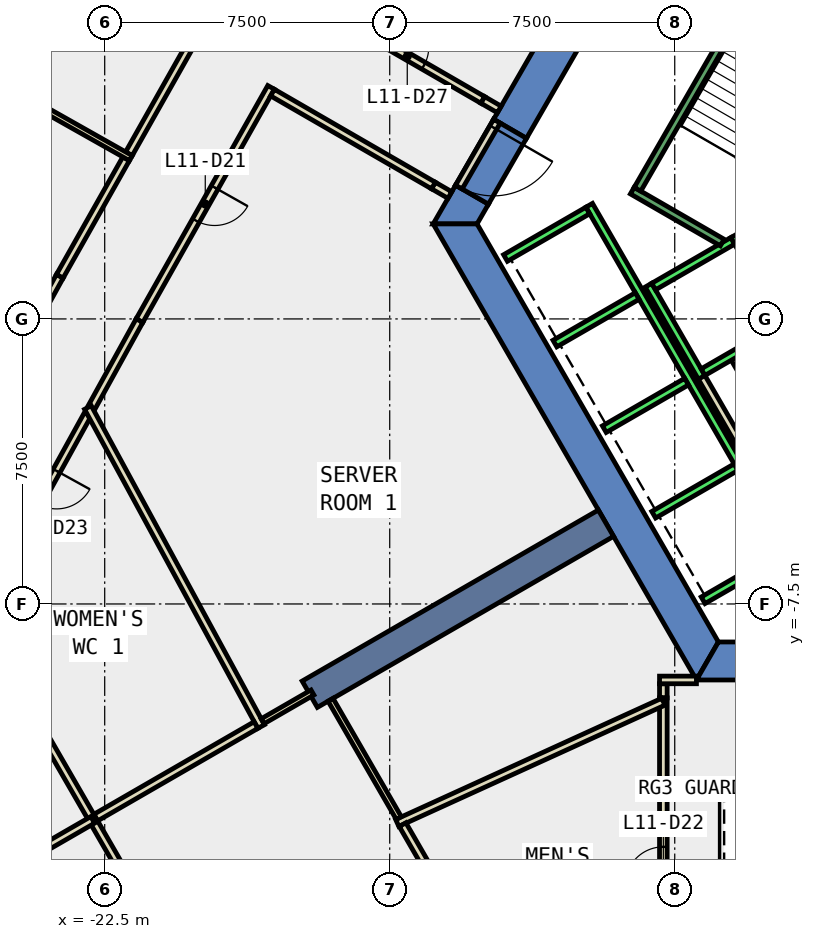
"""IFC4 building model, lengths in metres.
Left out: names, types, materials, properties, quantities, classifications, styles, units other than length and angle.
Written with IfcOpenShell. Run it as: python <this file> out.ifc"""

import sys

from ifc_helpers import new_model, si_unit, direction, frame, frame_2d, origin, place, context, subcontext, project, spatial, polyline, rectangle, outline, extrude, element, fill, save


model = new_model("IFC4")
c1 = context("Model", 3, precision=1e-05, world=origin(), true_north=direction((0.0, 1.0)))
c2 = subcontext(c1, "Body", "Model", "MODEL_VIEW")
j1 = project(units=[si_unit("LENGTHUNIT", "METRE"), si_unit("PLANEANGLEUNIT", "RADIAN")], contexts=[c1])
p1 = place(None, origin())
s1 = spatial("IfcSite", under=j1, at=p1, CompositionType="ELEMENT")
p2 = place(p1, origin())
s2 = spatial("IfcBuilding", under=s1, at=p2, CompositionType="ELEMENT")
p3 = place(p2, frame((0.0, 0.0, 56.0)))
s3 = spatial("IfcBuildingStorey", under=s2, at=p3, CompositionType="ELEMENT", Elevation=56.0)
p4 = place(p3, frame((0.0, 0.0, -0.4)))
e1 = element("IfcWall", 1, at=p4, inside=s3, PredefinedType="SHEAR", context=c2, shape_type="SweptSolid", body=[
    extrude(outline(polyline([(-12.267, 5.252), (-11.402, 4.752), (-6.351, 13.5), (-6.928, 14.5), (-12.267, 5.252)])), origin(), (0.0, 0.0, 1.0), 4.2),
])
p5 = place(p3, frame((0.0, 0.0, -0.4)))
e2 = element("IfcWall", 2, at=p5, inside=s3, PredefinedType="SHEAR", context=c2, shape_type="SweptSolid", body=[
    extrude(outline(polyline([(-12.402, 3.02), (-13.267, 3.52), (-13.856, 2.5), (-12.702, 2.5), (-12.402, 3.02)])), origin(), (0.0, 0.0, 1.0), 4.2),
])
p6 = place(p3, frame((0.0, 0.0, 3.6)))
e3 = element("IfcWall", 3, at=p6, inside=s3, PredefinedType="SHEAR", context=c2, shape_type="SweptSolid", body=[
    extrude(outline(polyline([(-13.267, 3.52), (-12.402, 3.02), (-11.402, 4.752), (-12.267, 5.252), (-13.267, 3.52)])), origin(), (0.0, 0.0, 1.0), 0.2),
])
p7 = place(p3, frame((0.0, 0.0, -0.4)))
e4 = element("IfcWall", 4, at=p7, inside=s3, PredefinedType="SHEAR", context=c2, shape_type="SweptSolid", body=[
    extrude(outline(polyline([(-13.856, 2.5), (-6.928, -9.5), (-6.351, -8.5), (-12.702, 2.5), (-13.856, 2.5)])), origin(), (0.0, 0.0, 1.0), 4.2),
])
p8 = place(p3, frame((0.0, 0.0, -0.4)))
e5 = element("IfcWall", 5, at=p8, inside=s3, PredefinedType="SHEAR", context=c2, shape_type="SweptSolid", body=[
    extrude(outline(polyline([(3.75, -9.5), (3.75, -8.5), (-6.351, -8.5), (-6.928, -9.5), (3.75, -9.5)])), origin(), (0.0, 0.0, 1.0), 4.2),
])
p9 = place(p3, frame((-9.31, -5.375, -0.4), z_axis=(0.0, 0.0, 1.0), x_axis=(-0.866017533419, -0.500013631625, 0.0)))
e6 = element("IfcWall", 6, at=p9, inside=s3, PredefinedType="SHEAR", context=c2, shape_type="SweptSolid", body=[
    extrude(rectangle(XDim=9.0, YDim=0.8, at=frame_2d((4.5, 0.0))), origin(), (0.0, 0.0, 1.0), 4.2),
])
p10 = place(p3, frame((-16.96, 8.308, 0.0), z_axis=(0.0, 0.0, 1.0), x_axis=(0.866018717003, -0.500011581666, 0.0)))
e7 = element("IfcWall", 7, at=p10, inside=s3, PredefinedType="PARTITIONING", context=c2, shape_type="SweptSolid", body=[
    extrude(rectangle(XDim=5.092, YDim=0.2, at=frame_2d((2.546, 0.0))), origin(), (0.0, 0.0, 1.0), 3.8),
])
p11 = place(p10, frame((2.296, 0.0, 0.0)))
e8 = element("IfcOpeningElement", 8, at=p11, cuts=e7, PredefinedType="OPENING", context=c2, shape_type="SweptSolid", body=[
    extrude(rectangle(XDim=1.0, YDim=2.1, at=frame_2d((0.5, 1.05))), frame((0.0, 0.11, 0.0), z_axis=(0.0, -1.0, 0.0), x_axis=(1.0, 0.0, 0.0)), (0.0, 0.0, 1.0), 0.22),
])
p12 = place(p3, frame((-13.417, 3.26, 0.0), z_axis=(0.0, 0.0, 1.0), x_axis=(-0.866071776036, 0.499919672301, 0.0)))
e9 = element("IfcWall", 9, at=p12, inside=s3, PredefinedType="PARTITIONING", context=c2, shape_type="SweptSolid", body=[
    extrude(rectangle(XDim=0.5, YDim=0.2, at=frame_2d((0.25, 0.0))), origin(), (0.0, 0.0, 1.0), 2.4),
])
p13 = place(p3, frame((-18.122, 6.092, 0.0), z_axis=(0.0, 0.0, 1.0), x_axis=(-0.491430359405, -0.870916874251, 0.0)))
e10 = element("IfcWall", 10, at=p13, inside=s3, PredefinedType="PARTITIONING", context=c2, shape_type="SweptSolid", body=[
    extrude(rectangle(XDim=7.047, YDim=0.2, at=frame_2d((3.523, 0.0))), origin(), (0.0, 0.0, 1.0), 3.8),
])
p14 = place(p13, frame((3.024, 0.0, 0.0)))
e11 = element("IfcOpeningElement", 11, at=p14, cuts=e10, PredefinedType="OPENING", context=c2, shape_type="SweptSolid", body=[
    extrude(rectangle(XDim=1.0, YDim=2.1, at=frame_2d((0.5, 1.05))), frame((0.0, 0.11, 0.0), z_axis=(0.0, -1.0, 0.0), x_axis=(1.0, 0.0, 0.0)), (0.0, 0.0, 1.0), 0.22),
])
p15 = place(p3, frame((-21.585, -0.045, 0.0), z_axis=(0.0, 0.0, 1.0), x_axis=(-0.483139162319, -0.875543573921, 0.0)))
e12 = element("IfcWall", 12, at=p15, inside=s3, PredefinedType="PARTITIONING", context=c2, shape_type="SweptSolid", body=[
    extrude(rectangle(XDim=2.61, YDim=0.2, at=frame_2d((1.305, 0.0))), origin(), (0.0, 0.0, 1.0), 3.8),
])
p16 = place(p3, frame((-22.942, -2.505, 0.0), z_axis=(0.0, 0.0, 1.0), x_axis=(-0.48320751977, -0.875505849688, 0.0)))
e13 = element("IfcWall", 13, at=p16, inside=s3, PredefinedType="PARTITIONING", context=c2, shape_type="SweptSolid", body=[
    extrude(rectangle(XDim=4.412, YDim=0.2, at=frame_2d((2.206, 0.0))), origin(), (0.0, 0.0, 1.0), 3.8),
])
p17 = place(p16, frame((1.706, 0.0, 0.0)))
e14 = element("IfcOpeningElement", 14, at=p17, cuts=e13, PredefinedType="OPENING", context=c2, shape_type="SweptSolid", body=[
    extrude(rectangle(XDim=1.0, YDim=2.1, at=frame_2d((0.5, 1.05))), frame((0.0, 0.11, 0.0), z_axis=(0.0, -1.0, 0.0), x_axis=(1.0, 0.0, 0.0)), (0.0, 0.0, 1.0), 0.22),
])
p18 = place(p3, frame((-21.863, 4.345, 0.0), z_axis=(0.0, 0.0, 1.0), x_axis=(0.491394823876, 0.87093692485, 0.0)))
e15 = element("IfcWall", 15, at=p18, inside=s3, PredefinedType="PARTITIONING", context=c2, shape_type="SweptSolid", body=[
    extrude(rectangle(XDim=3.547, YDim=0.2, at=frame_2d((1.773, 0.0))), origin(), (0.0, 0.0, 1.0), 3.8),
])
p19 = place(p3, frame((-27.217, -5.284, 0.0), z_axis=(0.0, 0.0, 1.0), x_axis=(0.483151415114, 0.875536812517, 0.0)))
e16 = element("IfcWall", 16, at=p19, inside=s3, PredefinedType="PARTITIONING", context=c2, shape_type="SweptSolid", body=[
    extrude(rectangle(XDim=7.319, YDim=0.2, at=frame_2d((3.659, 0.0))), origin(), (0.0, 0.0, 1.0), 3.8),
])
p20 = place(p19, frame((3.159, 0.0, 0.0)))
e17 = element("IfcOpeningElement", 17, at=p20, cuts=e16, PredefinedType="OPENING", context=c2, shape_type="SweptSolid", body=[
    extrude(rectangle(XDim=1.0, YDim=2.1, at=frame_2d((0.5, 1.05))), frame((0.0, 0.11, 0.0), z_axis=(0.0, -1.0, 0.0), x_axis=(1.0, 0.0, 0.0)), (0.0, 0.0, 1.0), 0.22),
])
p21 = place(p3, frame((-23.681, 1.124, 0.0), z_axis=(0.0, 0.0, 1.0), x_axis=(0.491485799319, 0.870885588965, 0.0)))
e18 = element("IfcWall", 18, at=p21, inside=s3, PredefinedType="PARTITIONING", context=c2, shape_type="SweptSolid", body=[
    extrude(rectangle(XDim=3.548, YDim=0.2, at=frame_2d((1.774, 0.0))), origin(), (0.0, 0.0, 1.0), 3.8),
])
p22 = place(p3, frame((-5.126, -2.422, 0.0), z_axis=(0.0, 0.0, 1.0), x_axis=(-0.500062241894, 0.865989465428, 0.0)))
e19 = element("IfcWall", 19, at=p22, inside=s3, PredefinedType="PARTITIONING", context=c2, shape_type="SweptSolid", body=[
    extrude(rectangle(XDim=1.7, YDim=0.2, at=frame_2d((0.85, 0.0))), origin(), (0.0, 0.0, 1.0), 3.8),
])
p23 = place(p3, frame((-5.492, -3.788, 0.0), z_axis=(0.0, 0.0, 1.0), x_axis=(-0.500008949224, 0.866020236886, 0.0)))
e20 = element("IfcWall", 20, at=p23, inside=s3, PredefinedType="PARTITIONING", context=c2, shape_type="SweptSolid", body=[
    extrude(rectangle(XDim=2.68, YDim=0.2, at=frame_2d((1.34, 0.0))), origin(), (0.0, 0.0, 1.0), 3.8),
])
p24 = place(p3, frame((-7.8, -9.972, 0.0), z_axis=(0.0, 0.0, 1.0), x_axis=(0.0, 1.0, 0.0)))
e21 = element("IfcWall", 21, at=p24, inside=s3, PredefinedType="PARTITIONING", context=c2, shape_type="SweptSolid", body=[
    extrude(rectangle(XDim=0.373, YDim=0.2, at=frame_2d((0.187, 0.0))), origin(), (0.0, 0.0, 1.0), 3.8),
])
p25 = place(p3, frame((-7.9, -9.499, 0.0), z_axis=(0.0, 0.0, 1.0), x_axis=(1.0, 0.0, 0.0)))
e22 = element("IfcWall", 22, at=p25, inside=s3, PredefinedType="PARTITIONING", context=c2, shape_type="SweptSolid", body=[
    extrude(rectangle(XDim=0.971, YDim=0.2, at=frame_2d((0.485, 0.0))), origin(), (0.0, 0.0, 1.0), 3.8),
])
p26 = place(p3, frame((-7.8, -18.809, 0.0), z_axis=(0.0, 0.0, 1.0), x_axis=(0.0, 1.0, 0.0)))
e23 = element("IfcWall", 23, at=p26, inside=s3, PredefinedType="PARTITIONING", context=c2, shape_type="SweptSolid", body=[
    extrude(rectangle(XDim=8.837, YDim=0.2, at=frame_2d((4.418, 0.0))), origin(), (0.0, 0.0, 1.0), 3.8),
])
p27 = place(p26, frame((3.918, 0.0, 0.0)))
e24 = element("IfcOpeningElement", 24, at=p27, cuts=e23, PredefinedType="OPENING", context=c2, shape_type="SweptSolid", body=[
    extrude(rectangle(XDim=1.0, YDim=2.1, at=frame_2d((0.5, 1.05))), frame((0.0, 0.11, 0.0), z_axis=(0.0, -1.0, 0.0), x_axis=(1.0, 0.0, 0.0)), (0.0, 0.0, 1.0), 0.22),
])
p28 = place(p3, frame((-7.8, -10.072, 0.0), z_axis=(0.0, 0.0, 1.0), x_axis=(-0.910011899741, -0.414582129777, 0.0)))
e25 = element("IfcWall", 25, at=p28, inside=s3, PredefinedType="PARTITIONING", context=c2, shape_type="SweptSolid", body=[
    extrude(rectangle(XDim=7.694, YDim=0.2, at=frame_2d((3.847, 0.0))), origin(), (0.0, 0.0, 1.0), 3.8),
])
p29 = place(p3, frame((-18.384, -10.725, 0.0), z_axis=(0.0, 0.0, 1.0), x_axis=(-0.477137547132, 0.878828630119, 0.0)))
e26 = element("IfcWall", 26, at=p29, inside=s3, PredefinedType="PARTITIONING", context=c2, shape_type="SweptSolid", body=[
    extrude(rectangle(XDim=9.552, YDim=0.2, at=frame_2d((4.776, 0.0))), origin(), (0.0, 0.0, 1.0), 3.8),
])
p30 = place(p3, frame((-14.761, -13.134, 0.0), z_axis=(0.0, 0.0, 1.0), x_axis=(-0.499704810774, 0.866195764299, 0.0)))
e27 = element("IfcWall", 27, at=p30, inside=s3, PredefinedType="PARTITIONING", context=c2, shape_type="SweptSolid", body=[
    extrude(rectangle(XDim=3.594, YDim=0.15, at=frame_2d((1.797, 0.0))), origin(), (0.0, 0.0, 1.0), 3.8),
])
p31 = place(p3, frame((-17.033, -9.829, 0.0), z_axis=(0.0, 0.0, 1.0), x_axis=(-0.866094414679, -0.49988045057, 0.0)))
e28 = element("IfcWall", 28, at=p31, inside=s3, PredefinedType="PARTITIONING", context=c2, shape_type="SweptSolid", body=[
    extrude(rectangle(XDim=1.516, YDim=0.15, at=frame_2d((0.758, 0.0))), origin(), (0.0, 0.0, 1.0), 3.8),
])
p32 = place(p3, frame((-11.527, -18.735, 0.0), z_axis=(0.0, 0.0, 1.0), x_axis=(-0.499976457224, 0.866038995786, 0.0)))
e29 = element("IfcWall", 29, at=p32, inside=s3, PredefinedType="PARTITIONING", context=c2, shape_type="SweptSolid", body=[
    extrude(rectangle(XDim=6.268, YDim=0.2, at=frame_2d((3.134, 0.0))), origin(), (0.0, 0.0, 1.0), 3.8),
])
p33 = place(p3, frame((-18.519, -10.687, 0.0), z_axis=(0.0, 0.0, 1.0), x_axis=(-0.866063668779, -0.499933717229, 0.0)))
e30 = element("IfcWall", 30, at=p33, inside=s3, PredefinedType="PARTITIONING", context=c2, shape_type="SweptSolid", body=[
    extrude(rectangle(XDim=4.969, YDim=0.2, at=frame_2d((2.484, 0.0))), origin(), (0.0, 0.0, 1.0), 3.8),
])
p34 = place(p3, frame((-22.822, -13.171, 0.0), z_axis=(0.0, 0.0, 1.0), x_axis=(-0.499974913987, 0.866039886717, 0.0)))
e31 = element("IfcWall", 31, at=p34, inside=s3, PredefinedType="PARTITIONING", context=c2, shape_type="SweptSolid", body=[
    extrude(rectangle(XDim=6.222, YDim=0.2, at=frame_2d((3.111, 0.0))), origin(), (0.0, 0.0, 1.0), 3.8),
])
p35 = place(p3, frame((-19.699, -18.581, 0.0), z_axis=(0.0, 0.0, 1.0), x_axis=(-0.499899838407, 0.866083224385, 0.0)))
e32 = element("IfcWall", 32, at=p35, inside=s3, PredefinedType="PARTITIONING", context=c2, shape_type="SweptSolid", body=[
    extrude(rectangle(XDim=6.235, YDim=0.2, at=frame_2d((3.118, 0.0))), origin(), (0.0, 0.0, 1.0), 3.8),
])
p36 = place(p3, frame((-22.816, -13.181, 0.0), z_axis=(0.0, 0.0, 1.0), x_axis=(-0.86601529143, -0.500017514703, 0.0)))
e33 = element("IfcWall", 33, at=p36, inside=s3, PredefinedType="PARTITIONING", context=c2, shape_type="SweptSolid", body=[
    extrude(rectangle(XDim=9.932, YDim=0.2, at=frame_2d((4.966, 0.0))), origin(), (0.0, 0.0, 1.0), 3.8),
])
p37 = place(p3, frame((-21.813, 4.231, 0.0), z_axis=(0.0, 0.0, 1.0), x_axis=(-0.870901264369, 0.491458022337, 0.0)))
e34 = element("IfcWall", 34, at=p37, inside=s3, PredefinedType="PARTITIONING", context=c2, shape_type="SweptSolid", body=[
    extrude(rectangle(XDim=7.6, YDim=0.15, at=frame_2d((3.8, 0.0))), origin(), (0.0, 0.0, 1.0), 3.8),
])
p38 = place(p3, frame((-12.18, 5.202, 0.0), z_axis=(0.0, 0.0, 1.0), x_axis=(-0.50002537861, -0.866010750942, 0.0)))
e35 = element("IfcWall", 35, at=p38, inside=s3, PredefinedType="PARTITIONING", context=c2, shape_type="SweptSolid", body=[
    extrude(rectangle(XDim=2.0, YDim=0.2, at=frame_2d((1.0, 0.0))), origin(), (0.0, 0.0, 1.0), 2.4),
])
p39 = place(p38, frame((0.19, 0.0, 0.0)))
e36 = element("IfcOpeningElement", 36, at=p39, cuts=e35, PredefinedType="OPENING", context=c2, shape_type="SweptSolid", body=[
    extrude(rectangle(XDim=1.8, YDim=2.1, at=frame_2d((0.9, 1.05))), frame((0.0, 0.11, 0.0), z_axis=(0.0, -1.0, 0.0), x_axis=(1.0, 0.0, 0.0)), (0.0, 0.0, 1.0), 0.22),
])
p40 = place(p3, frame((-12.55, 5.762, 0.0), z_axis=(0.0, 0.0, 1.0), x_axis=(0.866071776036, -0.499919672301, 0.0)))
e37 = element("IfcWall", 37, at=p40, inside=s3, PredefinedType="PARTITIONING", context=c2, shape_type="SweptSolid", body=[
    extrude(rectangle(XDim=0.5, YDim=0.2, at=frame_2d((0.25, 0.0))), origin(), (0.0, 0.0, 1.0), 2.4),
])
p41 = place(p3, frame((-13.85, 3.51, 0.0), z_axis=(0.0, 0.0, 1.0), x_axis=(-0.865969361037, 0.500097056325, 0.0)))
e38 = element("IfcWall", 38, at=p41, inside=s3, PredefinedType="PARTITIONING", context=c2, shape_type="SweptSolid", body=[
    extrude(rectangle(XDim=4.889, YDim=0.2, at=frame_2d((2.445, 0.0))), origin(), (0.0, 0.0, 1.0), 3.8),
])
p42 = place(p3, frame((-5.94, 2.188, 0.0), z_axis=(0.0, 0.0, 1.0), x_axis=(0.49994636267, -0.866056369097, 0.0)))
e39 = element("IfcWall", 39, at=p42, inside=s3, PredefinedType="STANDARD", context=c2, shape_type="SweptSolid", body=[
    extrude(rectangle(XDim=2.8, YDim=0.2, at=frame_2d((1.4, 0.0))), origin(), (0.0, 0.0, 1.0), 3.8),
])
p43 = place(p42, frame((1.225, 0.0, 0.0)))
e40 = element("IfcOpeningElement", 40, at=p43, cuts=e39, PredefinedType="OPENING", context=c2, shape_type="SweptSolid", body=[
    extrude(rectangle(XDim=1.1, YDim=2.1, at=frame_2d((0.55, 1.05))), frame((0.0, 0.11, 0.0), z_axis=(0.0, -1.0, 0.0), x_axis=(1.0, 0.0, 0.0)), (0.0, 0.0, 1.0), 0.22),
])
p44 = place(p3, frame((-8.192, 0.888, 0.0), z_axis=(0.0, 0.0, 1.0), x_axis=(0.49994636267, -0.866056369097, 0.0)))
e41 = element("IfcWall", 41, at=p44, inside=s3, PredefinedType="STANDARD", context=c2, shape_type="SweptSolid", body=[
    extrude(rectangle(XDim=2.8, YDim=0.2, at=frame_2d((1.4, 0.0))), origin(), (0.0, 0.0, 1.0), 3.8),
])
for number, where, z_axis, x_axis in (
    (42, (-5.977, 2.052, 0.0), (0.0, 0.0, 1.0), (-0.866, -0.5, 0.0)),
    (43, (-4.677, -0.2, 0.0), (0.0, 0.0, 1.0), (-0.866, -0.5, 0.0)),
):
    element("IfcWall", number, at=place(p3, frame(where, z_axis=z_axis, x_axis=x_axis)), inside=s3, PredefinedType="STANDARD", context=c2, shape_type="SweptSolid", body=[
        extrude(rectangle(XDim=2.399, YDim=0.2, at=frame_2d((1.2, 0.0))), origin(), (0.0, 0.0, 1.0), 3.8),
    ])
p45 = place(p3, frame((-9.751, 2.99, 0.0), z_axis=(0.0, 0.0, 1.0), x_axis=(0.50000090737, -0.866024879913, 0.0)))
e44 = element("IfcWall", 44, at=p45, inside=s3, PredefinedType="STANDARD", context=c2, shape_type="SweptSolid", body=[
    extrude(rectangle(XDim=10.6, YDim=0.2, at=frame_2d((5.3, 0.0))), origin(), (0.0, 0.0, 1.0), 3.8),
])
p46 = place(p3, frame((-9.788, 2.853, 0.0), z_axis=(0.0, 0.0, 1.0), x_axis=(-0.865998541277, -0.500046524342, 0.0)))
e45 = element("IfcWall", 45, at=p46, inside=s3, PredefinedType="STANDARD", context=c2, shape_type="SweptSolid", body=[
    extrude(rectangle(XDim=2.5, YDim=0.2, at=frame_2d((1.25, 0.0))), origin(), (0.0, 0.0, 1.0), 3.8),
])
for number, where, z_axis, x_axis in (
    (46, (-8.488, 0.602, 0.0), (0.0, 0.0, 1.0), (-0.866, -0.5, 0.0)),
    (47, (-7.188, -1.65, 0.0), (0.0, 0.0, 1.0), (-0.866, -0.5, 0.0)),
    (48, (-5.888, -3.902, 0.0), (0.0, 0.0, 1.0), (-0.866, -0.5, 0.0)),
    (49, (-4.588, -6.153, 0.0), (0.0, 0.0, 1.0), (-0.866, -0.5, 0.0)),
):
    element("IfcWall", number, at=place(p3, frame(where, z_axis=z_axis, x_axis=x_axis)), inside=s3, PredefinedType="STANDARD", context=c2, shape_type="SweptSolid", body=[
        extrude(rectangle(XDim=2.5, YDim=0.2, at=frame_2d((1.25, 0.0))), origin(), (0.0, 0.0, 1.0), 3.8),
    ])
p47 = place(p3, frame((-6.25, 2.01, 0.0), z_axis=(0.0, 0.0, 1.0), x_axis=(-0.86611865017, 0.499838457731, 0.0)))
e50 = element("IfcWall", 50, at=p47, inside=s3, PredefinedType="STANDARD", context=c2, shape_type="SweptSolid", body=[
    extrude(rectangle(XDim=2.733, YDim=0.2, at=frame_2d((1.366, 0.0))), origin(), (0.0, 0.0, 1.0), 3.8),
])
p48 = place(p3, frame((-5.03, 9.388, 0.0), z_axis=(0.0, 0.0, 1.0), x_axis=(-0.499978703459, -0.866037698999, 0.0)))
e51 = element("IfcWall", 51, at=p48, inside=s3, PredefinedType="STANDARD", context=c2, shape_type="SweptSolid", body=[
    extrude(rectangle(XDim=6.9, YDim=0.2, at=frame_2d((3.45, 0.0))), origin(), (0.0, 0.0, 1.0), 3.8),
])
p49 = place(p14, origin())
e52 = element("IfcDoor", 52, at=p49, inside=s3, OperationType="SINGLE_SWING_LEFT", PredefinedType="DOOR", context=c2, shape_type="SweptSolid", body=[
    extrude(rectangle(XDim=1.0, YDim=2.1, at=frame_2d((0.5, 1.05))), frame((0.0, 0.025, 0.0), z_axis=(0.0, -1.0, 0.0), x_axis=(1.0, 0.0, 0.0)), (0.0, 0.0, 1.0), 0.05),
])
fill(e11, e52)
p50 = place(p27, origin())
e53 = element("IfcDoor", 53, at=p50, inside=s3, OperationType="SINGLE_SWING_RIGHT", PredefinedType="DOOR", context=c2, shape_type="SweptSolid", body=[
    extrude(rectangle(XDim=1.0, YDim=2.1, at=frame_2d((0.5, 1.05))), frame((0.0, 0.025, 0.0), z_axis=(0.0, -1.0, 0.0), x_axis=(1.0, 0.0, 0.0)), (0.0, 0.0, 1.0), 0.05),
])
fill(e24, e53)
p51 = place(p17, origin())
e54 = element("IfcDoor", 54, at=p51, inside=s3, OperationType="SINGLE_SWING_LEFT", PredefinedType="DOOR", context=c2, shape_type="SweptSolid", body=[
    extrude(rectangle(XDim=1.0, YDim=2.1, at=frame_2d((0.5, 1.05))), frame((0.0, 0.025, 0.0), z_axis=(0.0, -1.0, 0.0), x_axis=(1.0, 0.0, 0.0)), (0.0, 0.0, 1.0), 0.05),
])
fill(e14, e54)
p52 = place(p11, origin())
e55 = element("IfcDoor", 55, at=p52, inside=s3, OperationType="SINGLE_SWING_LEFT", PredefinedType="DOOR", context=c2, shape_type="SweptSolid", body=[
    extrude(rectangle(XDim=1.0, YDim=2.1, at=frame_2d((0.5, 1.05))), frame((0.0, 0.025, 0.0), z_axis=(0.0, -1.0, 0.0), x_axis=(1.0, 0.0, 0.0)), (0.0, 0.0, 1.0), 0.05),
])
fill(e8, e55)
p53 = place(p39, origin())
e56 = element("IfcDoor", 56, at=p53, inside=s3, OperationType="DOUBLE_DOOR_SINGLE_SWING", PredefinedType="DOOR", context=c2, shape_type="SweptSolid", body=[
    extrude(rectangle(XDim=1.8, YDim=2.1, at=frame_2d((0.9, 1.05))), frame((0.0, 0.025, 0.0), z_axis=(0.0, -1.0, 0.0), x_axis=(1.0, 0.0, 0.0)), (0.0, 0.0, 1.0), 0.05),
])
fill(e36, e56)
save(model, sys.argv[1])
